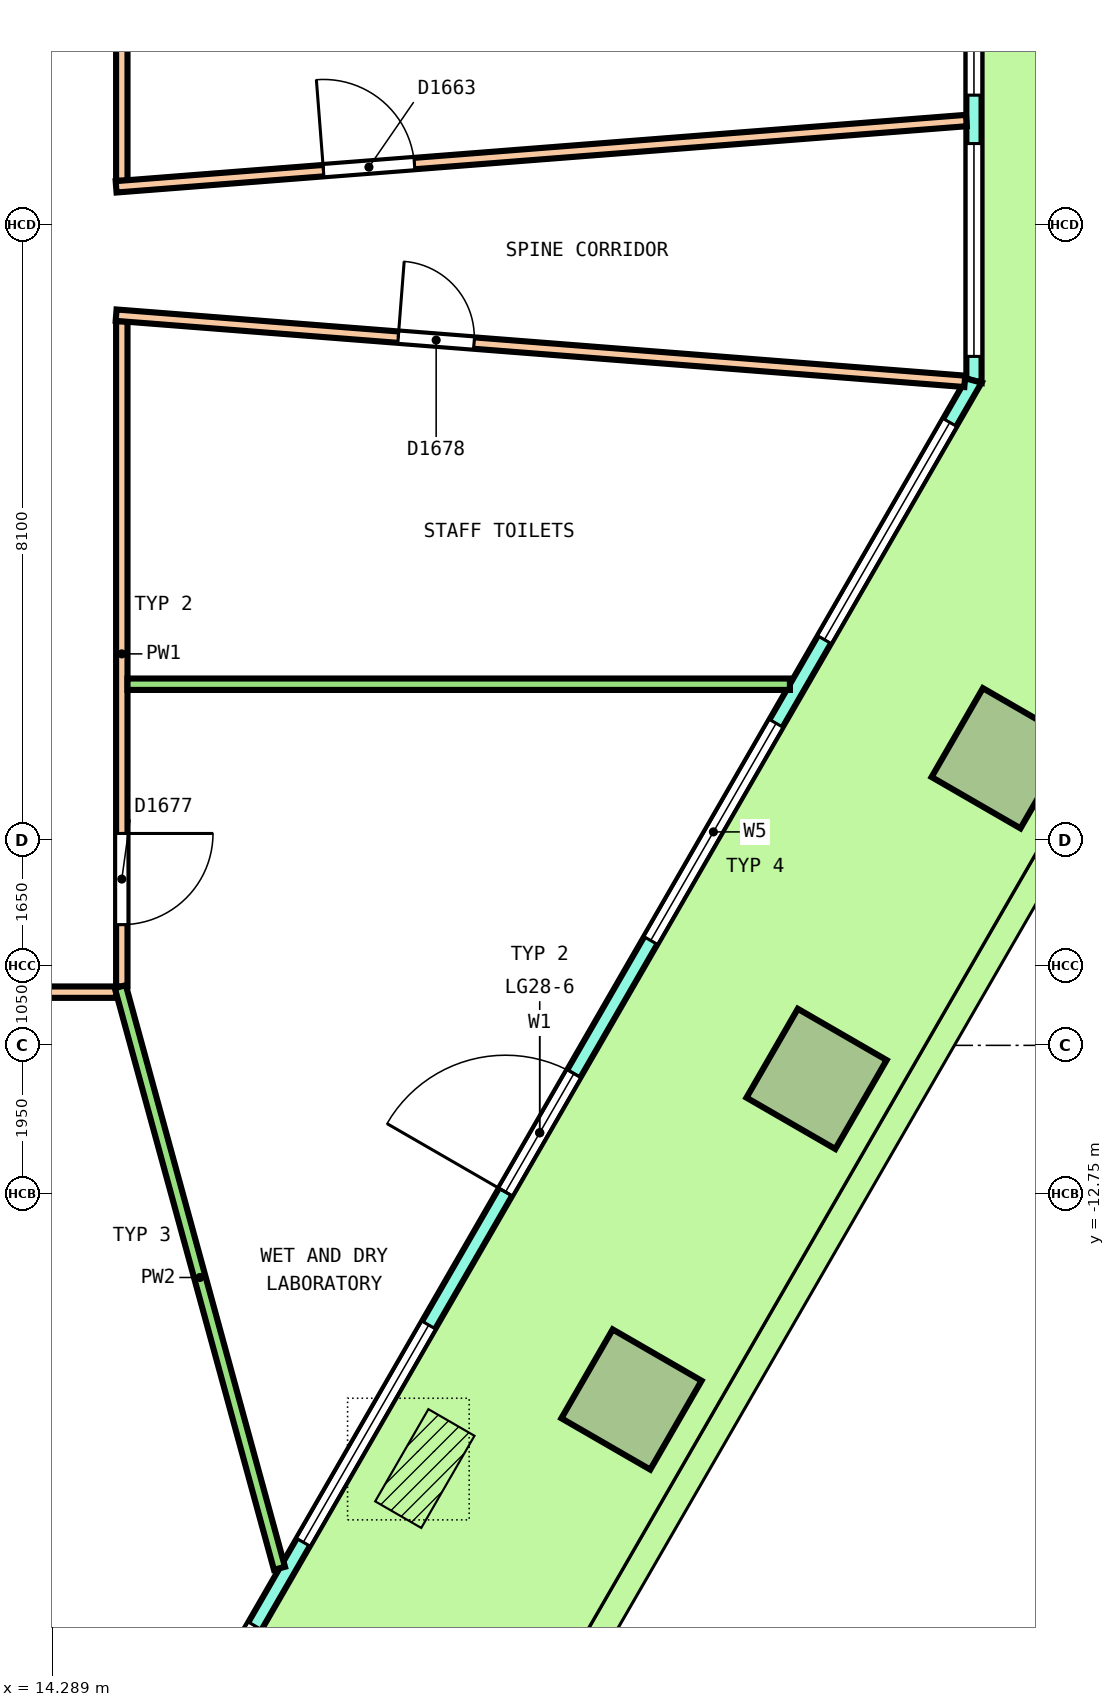
"""IFC4 building model, lengths in metres.
Left out: names, types, materials, properties, quantities, classifications, styles, units other than length and angle.
Written with IfcOpenShell. Run it as: python <this file> out.ifc"""

import sys

from ifc_helpers import new_model, si_unit, direction, frame, frame_2d, origin, origin_2d, place, context, subcontext, project, spatial, polyline, rectangle, outline, extrude, element, fill, save


model = new_model("IFC4")
c1 = context("Model", 3, precision=1e-05, world=origin(), true_north=direction((0.0, 1.0)))
c2 = subcontext(c1, "Body", "Model", "MODEL_VIEW")
j1 = project(units=[si_unit("LENGTHUNIT", "METRE"), si_unit("PLANEANGLEUNIT", "RADIAN")], contexts=[c1])
p1 = place(None, origin())
s1 = spatial("IfcSite", under=j1, at=p1, CompositionType="ELEMENT")
p2 = place(p1, origin())
s2 = spatial("IfcBuilding", under=s1, at=p2, CompositionType="ELEMENT")
p3 = place(p2, frame((0.0, 0.0, 130.8)))
s3 = spatial("IfcBuildingStorey", under=s2, at=p3, CompositionType="ELEMENT", Elevation=130.8)
for number, where, z_axis, x_axis in (
    (1, (21.905, -15.459, 0.0), (0.0, 0.0, 1.0), (0.5, 0.866, 0.0)),
    (2, (24.341, -11.241, 0.0), (0.0, 0.0, 1.0), (0.5, 0.866, 0.0)),
):
    element("IfcColumn", number, at=place(p3, frame(where, z_axis=z_axis, x_axis=x_axis)), inside=s3, PredefinedType="COLUMN", context=c2, shape_type="SweptSolid", body=[
        extrude(rectangle(XDim=1.35, YDim=1.35, at=origin_2d()), origin(), (0.0, 0.0, 1.0), 4.05),
    ])
p4 = place(p3, frame((26.776, -7.023, 0.0), z_axis=(0.0, 0.0, 1.0), x_axis=(0.5, 0.866025403784, 0.0)))
e3 = element("IfcColumn", 3, at=p4, inside=s3, PredefinedType="COLUMN", context=c2, shape_type="SweptSolid", body=[
    extrude(rectangle(XDim=1.35, YDim=1.35, at=origin_2d()), origin(), (0.0, 0.0, 1.0), 4.04),
])
p5 = place(p3, frame((26.411, -2.055, 0.0), z_axis=(0.0, 0.0, 1.0), x_axis=(0.0, 1.0, 0.0)))
e4 = element("IfcWall", 4, at=p5, inside=s3, PredefinedType="SOLIDWALL", context=c2, shape_type="SweptSolid", body=[
    extrude(outline(polyline([(-0.027, -0.1), (1.128, -0.1), (2.283, -0.1), (3.438, -0.1), (4.592, -0.1), (5.747, -0.1), (6.902, -0.1), (6.848, 0.1), (5.711, 0.1), (4.574, 0.1), (3.438, 0.1), (2.301, 0.1), (1.164, 0.1), (0.027, 0.1), (-0.027, -0.1)])), origin(), (0.0, 0.0, 1.0), 4.1),
])
p6 = place(p5, frame((0.319, 0.0, 0.1)))
e5 = element("IfcOpeningElement", 5, at=p6, cuts=e4, PredefinedType="OPENING", context=c2, shape_type="SweptSolid", body=[
    extrude(rectangle(XDim=2.8, YDim=2.9, at=frame_2d((1.4, 1.45))), frame((0.0, 0.11, 0.0), z_axis=(0.0, -1.0, 0.0), x_axis=(1.0, 0.0, 0.0)), (0.0, 0.0, 1.0), 0.22),
])
p7 = place(p5, frame((3.756, 0.0, 0.1)))
e6 = element("IfcOpeningElement", 6, at=p7, cuts=e4, PredefinedType="OPENING", context=c2, shape_type="SweptSolid", body=[
    extrude(rectangle(XDim=2.8, YDim=2.9, at=frame_2d((1.4, 1.45))), frame((0.0, 0.11, 0.0), z_axis=(0.0, -1.0, 0.0), x_axis=(1.0, 0.0, 0.0)), (0.0, 0.0, 1.0), 0.22),
])
p8 = place(p3, frame((14.985, -21.845, 0.0), z_axis=(0.0, 0.0, 1.0), x_axis=(0.50000204422, 0.86602422355, 0.0)))
e7 = element("IfcWall", 7, at=p8, inside=s3, PredefinedType="SOLIDWALL", context=c2, shape_type="SweptSolid", body=[
    extrude(outline(polyline([(-0.027, -0.1), (1.014, -0.1), (2.055, -0.1), (3.097, -0.1), (4.138, -0.1), (5.179, -0.1), (6.22, -0.1), (7.261, -0.1), (8.303, -0.1), (9.344, -0.1), (10.385, -0.1), (11.426, -0.1), (12.468, -0.1), (13.509, -0.1), (14.55, -0.1), (15.591, -0.1), (16.632, -0.1), (17.673, -0.1), (18.715, -0.1), (19.756, -0.1), (20.797, -0.1), (21.838, -0.1), (22.879, -0.1), (22.826, 0.1), (21.789, 0.1), (20.753, 0.1), (19.717, 0.1), (18.68, 0.1), (17.644, 0.1), (16.608, 0.1), (15.572, 0.1), (14.535, 0.1), (13.499, 0.1), (12.463, 0.1), (11.426, 0.1), (10.39, 0.1), (9.354, 0.1), (8.317, 0.1), (7.281, 0.1), (6.245, 0.1), (5.208, 0.1), (4.172, 0.1), (3.136, 0.1), (2.099, 0.1), (1.063, 0.1), (0.027, 0.1), (-0.027, -0.1)])), origin(), (0.0, 0.0, 1.0), 4.1),
])
p9 = place(p8, frame((0.635, 0.0, 0.1)))
e8 = element("IfcOpeningElement", 8, at=p9, cuts=e7, PredefinedType="OPENING", context=c2, shape_type="SweptSolid", body=[
    extrude(rectangle(XDim=3.3, YDim=2.9, at=frame_2d((1.65, 1.45))), frame((0.0, 0.11, 0.0), z_axis=(0.0, -1.0, 0.0), x_axis=(1.0, 0.0, 0.0)), (0.0, 0.0, 1.0), 0.22),
])
p10 = place(p8, frame((5.206, 0.0, 0.1)))
e9 = element("IfcOpeningElement", 9, at=p10, cuts=e7, PredefinedType="OPENING", context=c2, shape_type="SweptSolid", body=[
    extrude(rectangle(XDim=3.3, YDim=2.9, at=frame_2d((1.65, 1.45))), frame((0.0, 0.11, 0.0), z_axis=(0.0, -1.0, 0.0), x_axis=(1.0, 0.0, 0.0)), (0.0, 0.0, 1.0), 0.22),
])
p11 = place(p8, frame((10.526, 0.0, 0.0)))
e10 = element("IfcOpeningElement", 10, at=p11, cuts=e7, PredefinedType="OPENING", context=c2, shape_type="SweptSolid", body=[
    extrude(rectangle(XDim=1.8, YDim=2.4, at=frame_2d((0.9, 1.2))), frame((0.0, 0.11, 0.0), z_axis=(0.0, -1.0, 0.0), x_axis=(1.0, 0.0, 0.0)), (0.0, 0.0, 1.0), 0.22),
])
p12 = place(p8, frame((10.526, 0.0, 2.55)))
e11 = element("IfcOpeningElement", 11, at=p12, cuts=e7, PredefinedType="OPENING", context=c2, shape_type="SweptSolid", body=[
    extrude(rectangle(XDim=1.8, YDim=0.45, at=frame_2d((0.9, 0.225))), frame((0.0, 0.11, 0.0), z_axis=(0.0, -1.0, 0.0), x_axis=(1.0, 0.0, 0.0)), (0.0, 0.0, 1.0), 0.22),
])
p13 = place(p8, frame((14.347, 0.0, 0.1)))
e12 = element("IfcOpeningElement", 12, at=p13, cuts=e7, PredefinedType="OPENING", context=c2, shape_type="SweptSolid", body=[
    extrude(rectangle(XDim=3.3, YDim=2.9, at=frame_2d((1.65, 1.45))), frame((0.0, 0.11, 0.0), z_axis=(0.0, -1.0, 0.0), x_axis=(1.0, 0.0, 0.0)), (0.0, 0.0, 1.0), 0.22),
])
p14 = place(p8, frame((18.917, 0.0, 0.1)))
e13 = element("IfcOpeningElement", 13, at=p14, cuts=e7, PredefinedType="OPENING", context=c2, shape_type="SweptSolid", body=[
    extrude(rectangle(XDim=3.3, YDim=2.9, at=frame_2d((1.65, 1.45))), frame((0.0, 0.11, 0.0), z_axis=(0.0, -1.0, 0.0), x_axis=(1.0, 0.0, 0.0)), (0.0, 0.0, 1.0), 0.22),
])
p15 = place(p3, frame((15.2, -10.025, 0.0), z_axis=(0.0, 0.0, 1.0), x_axis=(0.0, 1.0, 0.0)))
e14 = element("IfcWall", 14, at=p15, inside=s3, PredefinedType="PARTITIONING", context=c2, shape_type="SweptSolid", body=[
    extrude(rectangle(XDim=8.75, YDim=0.15, at=frame_2d((4.375, 0.0))), origin(), (0.0, 0.0, 1.0), 3.05),
])
p16 = place(p15, frame((0.813, 0.0, 0.0)))
e15 = element("IfcOpeningElement", 15, at=p16, cuts=e14, PredefinedType="OPENING", context=c2, shape_type="SweptSolid", body=[
    extrude(rectangle(XDim=1.2, YDim=2.1, at=frame_2d((0.6, 1.05))), frame((0.0, 0.085, 0.0), z_axis=(0.0, -1.0, 0.0), x_axis=(1.0, 0.0, 0.0)), (0.0, 0.0, 1.0), 0.17),
])
p17 = place(p3, frame((15.2, 0.576, 0.0), z_axis=(0.0, 0.0, 1.0), x_axis=(0.0, 1.0, 0.0)))
e16 = element("IfcWall", 16, at=p17, inside=s3, PredefinedType="PARTITIONING", context=c2, shape_type="SweptSolid", body=[
    extrude(rectangle(XDim=9.449, YDim=0.15, at=frame_2d((4.725, 0.0))), origin(), (0.0, 0.0, 1.0), 3.05),
])
p18 = place(p3, frame((-15.275, -10.1, 0.0), z_axis=(0.0, 0.0, 1.0), x_axis=(1.0, 0.0, 0.0)))
e17 = element("IfcWall", 17, at=p18, inside=s3, PredefinedType="PARTITIONING", context=c2, shape_type="SweptSolid", body=[
    extrude(rectangle(XDim=30.4, YDim=0.15, at=frame_2d((15.2, 0.0))), origin(), (0.0, 0.0, 1.0), 3.05),
])
p19 = place(p18, frame((1.506, 0.0, 0.0)))
e18 = element("IfcOpeningElement", 18, at=p19, cuts=e17, PredefinedType="OPENING", context=c2, shape_type="SweptSolid", body=[
    extrude(rectangle(XDim=1.0, YDim=2.1, at=frame_2d((0.5, 1.05))), frame((0.0, 0.085, 0.0), z_axis=(0.0, -1.0, 0.0), x_axis=(1.0, 0.0, 0.0)), (0.0, 0.0, 1.0), 0.17),
])
p20 = place(p18, frame((7.84, 0.0, 0.0)))
e19 = element("IfcOpeningElement", 19, at=p20, cuts=e17, PredefinedType="OPENING", context=c2, shape_type="SweptSolid", body=[
    extrude(rectangle(XDim=1.0, YDim=2.1, at=frame_2d((0.5, 1.05))), frame((0.0, 0.085, 0.0), z_axis=(0.0, -1.0, 0.0), x_axis=(1.0, 0.0, 0.0)), (0.0, 0.0, 1.0), 0.17),
])
p21 = place(p18, frame((15.685, 0.0, 0.0)))
e20 = element("IfcOpeningElement", 20, at=p21, cuts=e17, PredefinedType="OPENING", context=c2, shape_type="SweptSolid", body=[
    extrude(rectangle(XDim=1.2, YDim=2.1, at=frame_2d((0.6, 1.05))), frame((0.0, 0.085, 0.0), z_axis=(0.0, -1.0, 0.0), x_axis=(1.0, 0.0, 0.0)), (0.0, 0.0, 1.0), 0.17),
])
p22 = place(p18, frame((23.812, 0.0, 0.0)))
e21 = element("IfcOpeningElement", 21, at=p22, cuts=e17, PredefinedType="OPENING", context=c2, shape_type="SweptSolid", body=[
    extrude(rectangle(XDim=1.2, YDim=2.1, at=frame_2d((0.6, 1.05))), frame((0.0, 0.085, 0.0), z_axis=(0.0, -1.0, 0.0), x_axis=(1.0, 0.0, 0.0)), (0.0, 0.0, 1.0), 0.17),
])
p23 = place(p3, frame((15.125, 0.495, 0.0), z_axis=(0.0, 0.0, 1.0), x_axis=(0.996973035288, 0.07774809907, 0.0)))
e22 = element("IfcWall", 22, at=p23, inside=s3, PredefinedType="PARTITIONING", context=c2, shape_type="SweptSolid", body=[
    extrude(rectangle(XDim=11.22, YDim=0.15, at=frame_2d((5.61, 0.0))), origin(), (0.0, 0.0, 1.0), 3.05),
])
p24 = place(p23, frame((2.736, 0.0, 0.0)))
e23 = element("IfcOpeningElement", 23, at=p24, cuts=e22, PredefinedType="OPENING", context=c2, shape_type="SweptSolid", body=[
    extrude(rectangle(XDim=1.2, YDim=2.1, at=frame_2d((0.6, 1.05))), frame((0.0, 0.085, 0.0), z_axis=(0.0, -1.0, 0.0), x_axis=(1.0, 0.0, 0.0)), (0.0, 0.0, 1.0), 0.17),
])
p25 = place(p3, frame((15.125, -1.194, 0.0), z_axis=(0.0, 0.0, 1.0), x_axis=(0.996973662759, -0.07774005251, 0.0)))
e24 = element("IfcWall", 24, at=p25, inside=s3, PredefinedType="PARTITIONING", context=c2, shape_type="SweptSolid", body=[
    extrude(rectangle(XDim=11.199, YDim=0.15, at=frame_2d((5.6, 0.0))), origin(), (0.0, 0.0, 1.0), 3.05),
])
p26 = place(p25, frame((3.723, 0.0, 0.0)))
e25 = element("IfcOpeningElement", 25, at=p26, cuts=e24, PredefinedType="OPENING", context=c2, shape_type="SweptSolid", body=[
    extrude(rectangle(XDim=1.0, YDim=2.1, at=frame_2d((0.5, 1.05))), frame((0.0, 0.085, 0.0), z_axis=(0.0, -1.0, 0.0), x_axis=(1.0, 0.0, 0.0)), (0.0, 0.0, 1.0), 0.17),
])
p27 = place(p3, frame((15.18, -10.028, 0.0), z_axis=(0.0, 0.0, 1.0), x_axis=(0.263973985393, -0.964529799973, 0.0)))
e26 = element("IfcWall", 26, at=p27, inside=s3, PredefinedType="PARTITIONING", context=c2, shape_type="SweptSolid", body=[
    extrude(rectangle(XDim=7.934, YDim=0.15, at=frame_2d((3.967, 0.0))), origin(), (0.0, 0.0, 1.0), 3.05),
])
p28 = place(p3, frame((15.275, -6.049, 0.0), z_axis=(0.0, 0.0, 1.0), x_axis=(1.0, 0.0, 0.0)))
e27 = element("IfcWall", 27, at=p28, inside=s3, PredefinedType="PARTITIONING", context=c2, shape_type="SweptSolid", body=[
    extrude(rectangle(XDim=8.715, YDim=0.15, at=frame_2d((4.357, 0.0))), origin(), (0.0, 0.0, 1.0), 3.05),
])
p29 = place(p6, origin())
e28 = element("IfcWindow", 28, at=p29, inside=s3, PartitioningType="SINGLE_PANEL", PredefinedType="WINDOW", context=c2, shape_type="SweptSolid", body=[
    extrude(rectangle(XDim=2.8, YDim=2.9, at=frame_2d((1.4, 1.45))), frame((0.0, 0.03, 0.0), z_axis=(0.0, -1.0, 0.0), x_axis=(1.0, 0.0, 0.0)), (0.0, 0.0, 1.0), 0.06),
])
fill(e5, e28)
p30 = place(p7, origin())
e29 = element("IfcWindow", 29, at=p30, inside=s3, PartitioningType="SINGLE_PANEL", PredefinedType="WINDOW", context=c2, shape_type="SweptSolid", body=[
    extrude(rectangle(XDim=2.8, YDim=2.9, at=frame_2d((1.4, 1.45))), frame((0.0, 0.03, 0.0), z_axis=(0.0, -1.0, 0.0), x_axis=(1.0, 0.0, 0.0)), (0.0, 0.0, 1.0), 0.06),
])
fill(e6, e29)
p31 = place(p9, origin())
e30 = element("IfcWindow", 30, at=p31, inside=s3, PartitioningType="SINGLE_PANEL", PredefinedType="WINDOW", context=c2, shape_type="SweptSolid", body=[
    extrude(rectangle(XDim=3.3, YDim=2.9, at=frame_2d((1.65, 1.45))), frame((0.0, 0.03, 0.0), z_axis=(0.0, -1.0, 0.0), x_axis=(1.0, 0.0, 0.0)), (0.0, 0.0, 1.0), 0.06),
])
fill(e8, e30)
p32 = place(p10, origin())
e31 = element("IfcWindow", 31, at=p32, inside=s3, PartitioningType="SINGLE_PANEL", PredefinedType="WINDOW", context=c2, shape_type="SweptSolid", body=[
    extrude(rectangle(XDim=3.3, YDim=2.9, at=frame_2d((1.65, 1.45))), frame((0.0, 0.03, 0.0), z_axis=(0.0, -1.0, 0.0), x_axis=(1.0, 0.0, 0.0)), (0.0, 0.0, 1.0), 0.06),
])
fill(e9, e31)
p33 = place(p11, origin())
e32 = element("IfcDoor", 32, at=p33, inside=s3, OperationType="DOUBLE_DOOR_SINGLE_SWING", PredefinedType="DOOR", context=c2, shape_type="SweptSolid", body=[
    extrude(rectangle(XDim=1.8, YDim=2.4, at=frame_2d((0.9, 1.2))), frame((0.0, 0.025, 0.0), z_axis=(0.0, -1.0, 0.0), x_axis=(1.0, 0.0, 0.0)), (0.0, 0.0, 1.0), 0.05),
])
fill(e10, e32)
p34 = place(p12, origin())
e33 = element("IfcWindow", 33, at=p34, inside=s3, PartitioningType="SINGLE_PANEL", PredefinedType="WINDOW", context=c2, shape_type="SweptSolid", body=[
    extrude(rectangle(XDim=1.8, YDim=0.45, at=frame_2d((0.9, 0.225))), frame((0.0, 0.03, 0.0), z_axis=(0.0, -1.0, 0.0), x_axis=(1.0, 0.0, 0.0)), (0.0, 0.0, 1.0), 0.06),
])
fill(e11, e33)
p35 = place(p13, origin())
e34 = element("IfcWindow", 34, at=p35, inside=s3, PartitioningType="SINGLE_PANEL", PredefinedType="WINDOW", context=c2, shape_type="SweptSolid", body=[
    extrude(rectangle(XDim=3.3, YDim=2.9, at=frame_2d((1.65, 1.45))), frame((0.0, 0.03, 0.0), z_axis=(0.0, -1.0, 0.0), x_axis=(1.0, 0.0, 0.0)), (0.0, 0.0, 1.0), 0.06),
])
fill(e12, e34)
p36 = place(p14, origin())
e35 = element("IfcWindow", 35, at=p36, inside=s3, PartitioningType="SINGLE_PANEL", PredefinedType="WINDOW", context=c2, shape_type="SweptSolid", body=[
    extrude(rectangle(XDim=3.3, YDim=2.9, at=frame_2d((1.65, 1.45))), frame((0.0, 0.03, 0.0), z_axis=(0.0, -1.0, 0.0), x_axis=(1.0, 0.0, 0.0)), (0.0, 0.0, 1.0), 0.06),
])
fill(e13, e35)
p37 = place(p24, origin())
e36 = element("IfcDoor", 36, at=p37, inside=s3, OperationType="DOUBLE_DOOR_SINGLE_SWING", PredefinedType="DOOR", context=c2, shape_type="SweptSolid", body=[
    extrude(rectangle(XDim=1.2, YDim=2.1, at=frame_2d((0.6, 1.05))), frame((0.0, 0.025, 0.0), z_axis=(0.0, -1.0, 0.0), x_axis=(1.0, 0.0, 0.0)), (0.0, 0.0, 1.0), 0.05),
])
fill(e23, e36)
p38 = place(p16, origin())
e37 = element("IfcDoor", 37, at=p38, inside=s3, OperationType="DOUBLE_DOOR_SINGLE_SWING", PredefinedType="DOOR", context=c2, shape_type="SweptSolid", body=[
    extrude(rectangle(XDim=1.2, YDim=2.1, at=frame_2d((0.6, 1.05))), frame((0.0, 0.025, 0.0), z_axis=(0.0, -1.0, 0.0), x_axis=(1.0, 0.0, 0.0)), (0.0, 0.0, 1.0), 0.05),
])
fill(e15, e37)
p39 = place(p26, origin())
e38 = element("IfcDoor", 38, at=p39, inside=s3, OperationType="SINGLE_SWING_RIGHT", PredefinedType="DOOR", context=c2, shape_type="SweptSolid", body=[
    extrude(rectangle(XDim=1.0, YDim=2.1, at=frame_2d((0.5, 1.05))), frame((0.0, 0.025, 0.0), z_axis=(0.0, -1.0, 0.0), x_axis=(1.0, 0.0, 0.0)), (0.0, 0.0, 1.0), 0.05),
])
fill(e25, e38)
save(model, sys.argv[1])
